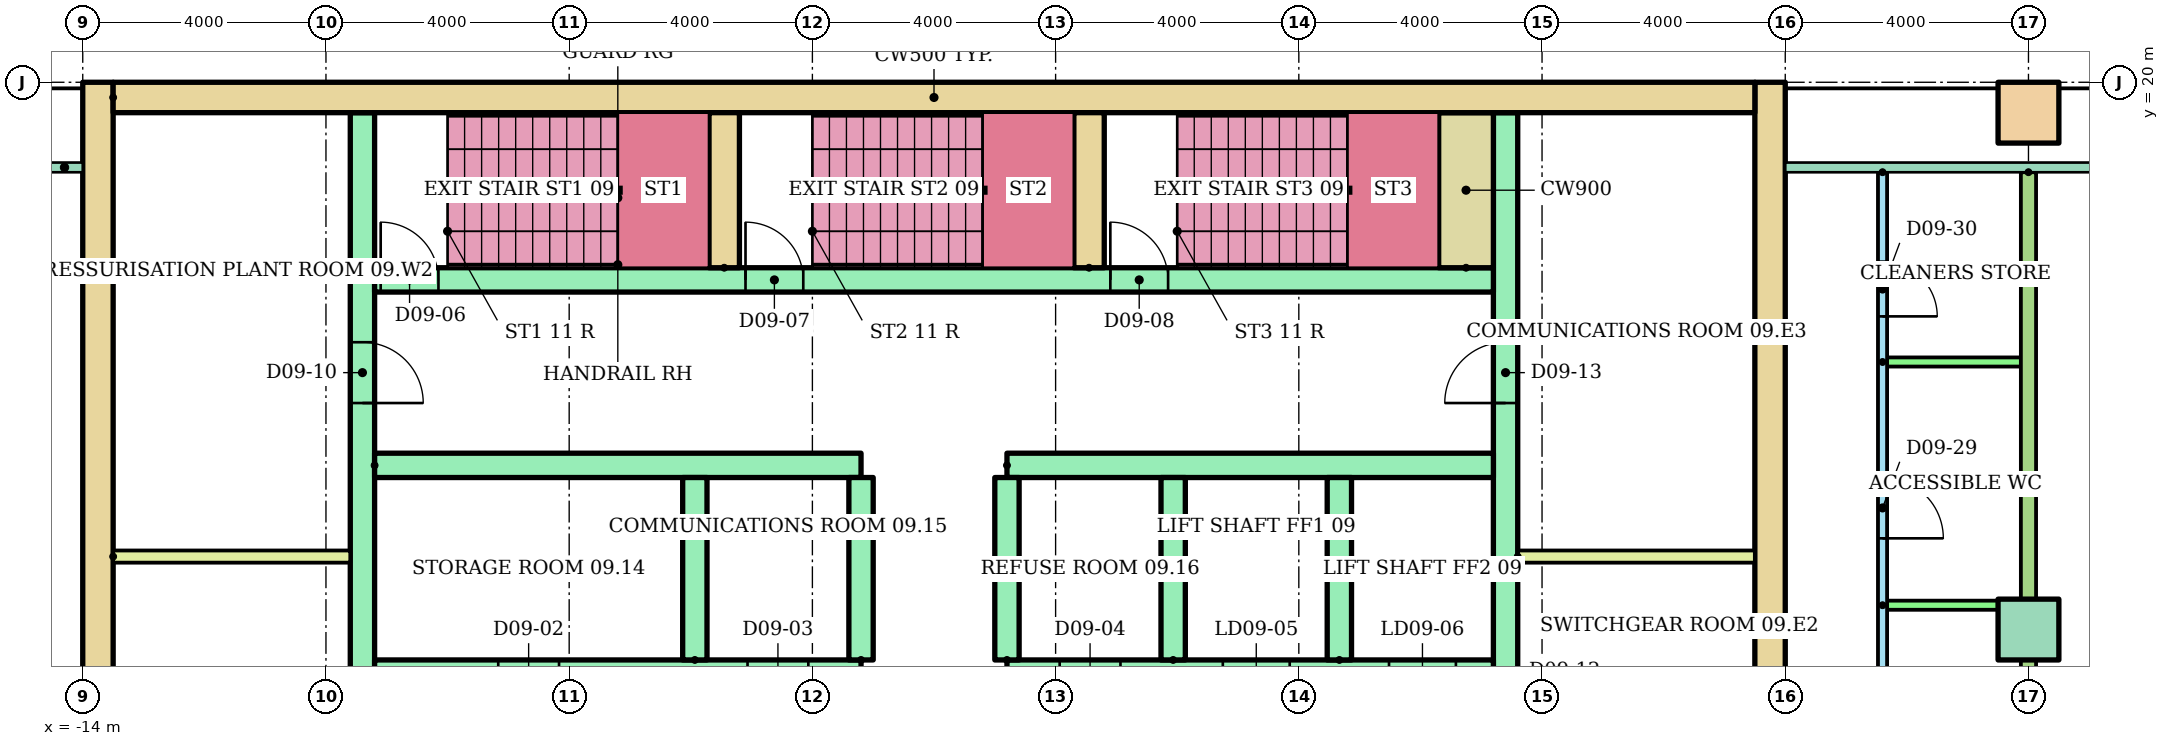
"""IFC4 building model, lengths in metres.
Left out: names, types, materials, properties, quantities, classifications, styles, units other than length and angle.
Written with IfcOpenShell. Run it as: python <this file> out.ifc"""

import sys

from ifc_helpers import new_model, si_unit, direction, frame, frame_2d, origin, origin_2d, place, context, subcontext, project, spatial, rectangle, hollow_rectangle, extrude, element, fill, save


model = new_model("IFC4")
c1 = context("Model", 3, precision=1e-05, world=origin(), true_north=direction((0.0, 1.0)))
c2 = subcontext(c1, "Body", "Model", "MODEL_VIEW")
j1 = project(units=[si_unit("LENGTHUNIT", "METRE"), si_unit("PLANEANGLEUNIT", "RADIAN")], contexts=[c1])
p1 = place(None, origin())
s1 = spatial("IfcSite", under=j1, at=p1, CompositionType="ELEMENT")
p2 = place(p1, origin())
s2 = spatial("IfcBuilding", under=s1, at=p2, CompositionType="ELEMENT")
p3 = place(p2, frame((0.0, 0.0, 37.7)))
s3 = spatial("IfcBuildingStorey", under=s2, at=p3, CompositionType="ELEMENT", Elevation=37.7)
p4 = place(p3, frame((18.0, 11.0, 0.0)))
e1 = element("IfcColumn", 1, at=p4, inside=s3, PredefinedType="COLUMN", context=c2, shape_type="SweptSolid", body=[
    extrude(rectangle(XDim=1.0, YDim=1.0, at=origin_2d()), origin(), (0.0, 0.0, 1.0), 3.9),
])
p5 = place(p3, frame((18.0, 19.5, 0.0)))
e2 = element("IfcColumn", 2, at=p5, inside=s3, PredefinedType="COLUMN", context=c2, shape_type="SweptSolid", body=[
    extrude(hollow_rectangle(XDim=1.0, YDim=1.0, WallThickness=0.05, at=origin_2d()), origin(), (0.0, 0.0, 1.0), 3.9),
])
for number, where, z_axis, x_axis in (
    (3, (-13.75, 3.0, 0.0), (0.0, 0.0, 1.0), (0.0, 1.0, 0.0)),
    (4, (13.75, 3.0, 0.0), (0.0, 0.0, 1.0), (0.0, 1.0, 0.0)),
):
    element("IfcWall", number, at=place(p3, frame(where, z_axis=z_axis, x_axis=x_axis)), inside=s3, PredefinedType="SHEAR", context=c2, shape_type="SweptSolid", body=[
        extrude(rectangle(XDim=17.0, YDim=0.5, at=frame_2d((8.5, 0.0))), origin(), (0.0, 0.0, 1.0), 3.62),
    ])
p6 = place(p3, frame((-13.5, 19.75, 0.0)))
e5 = element("IfcWall", 5, at=p6, inside=s3, PredefinedType="SHEAR", context=c2, shape_type="SweptSolid", body=[
    extrude(rectangle(XDim=27.0, YDim=0.5, at=frame_2d((13.5, 0.0))), origin(), (0.0, 0.0, 1.0), 3.62),
])
p7 = place(p3, frame((-9.4, 6.8, 0.0), z_axis=(0.0, 0.0, 1.0), x_axis=(0.0, 1.0, 0.0)))
e6 = element("IfcWall", 6, at=p7, inside=s3, PredefinedType="SHEAR", context=c2, shape_type="SweptSolid", body=[
    extrude(rectangle(XDim=12.7, YDim=0.4, at=frame_2d((6.35, 0.0))), origin(), (0.0, 0.0, 1.0), 3.62),
])
p8 = place(p7, frame((1.15, 0.0, 0.0)))
e7 = element("IfcOpeningElement", 7, at=p8, cuts=e6, PredefinedType="OPENING", context=c2, shape_type="SweptSolid", body=[
    extrude(rectangle(XDim=1.0, YDim=2.1, at=frame_2d((0.5, 1.05))), frame((0.0, 0.21, 0.0), z_axis=(0.0, -1.0, 0.0), x_axis=(1.0, 0.0, 0.0)), (0.0, 0.0, 1.0), 0.42),
])
p9 = place(p7, frame((7.925, 0.0, 0.0)))
e8 = element("IfcOpeningElement", 8, at=p9, cuts=e6, PredefinedType="OPENING", context=c2, shape_type="SweptSolid", body=[
    extrude(rectangle(XDim=1.0, YDim=2.1, at=frame_2d((0.5, 1.05))), frame((0.0, 0.21, 0.0), z_axis=(0.0, -1.0, 0.0), x_axis=(1.0, 0.0, 0.0)), (0.0, 0.0, 1.0), 0.42),
])
p10 = place(p3, frame((9.4, 6.8, 0.0), z_axis=(0.0, 0.0, 1.0), x_axis=(0.0, 1.0, 0.0)))
e9 = element("IfcWall", 9, at=p10, inside=s3, PredefinedType="SHEAR", context=c2, shape_type="SweptSolid", body=[
    extrude(rectangle(XDim=12.7, YDim=0.4, at=frame_2d((6.35, 0.0))), origin(), (0.0, 0.0, 1.0), 3.62),
])
p11 = place(p10, frame((0.3, 0.0, 0.0)))
e10 = element("IfcOpeningElement", 10, at=p11, cuts=e9, PredefinedType="OPENING", context=c2, shape_type="SweptSolid", body=[
    extrude(rectangle(XDim=1.0, YDim=2.1, at=frame_2d((0.5, 1.05))), frame((0.0, 0.21, 0.0), z_axis=(0.0, -1.0, 0.0), x_axis=(1.0, 0.0, 0.0)), (0.0, 0.0, 1.0), 0.42),
])
p12 = place(p10, frame((2.05, 0.0, 0.0)))
e11 = element("IfcOpeningElement", 11, at=p12, cuts=e9, PredefinedType="OPENING", context=c2, shape_type="SweptSolid", body=[
    extrude(rectangle(XDim=1.0, YDim=2.1, at=frame_2d((0.5, 1.05))), frame((0.0, 0.21, 0.0), z_axis=(0.0, -1.0, 0.0), x_axis=(1.0, 0.0, 0.0)), (0.0, 0.0, 1.0), 0.42),
])
p13 = place(p10, frame((7.925, 0.0, 0.0)))
e12 = element("IfcOpeningElement", 12, at=p13, cuts=e9, PredefinedType="OPENING", context=c2, shape_type="SweptSolid", body=[
    extrude(rectangle(XDim=1.0, YDim=2.1, at=frame_2d((0.5, 1.05))), frame((0.0, 0.21, 0.0), z_axis=(0.0, -1.0, 0.0), x_axis=(1.0, 0.0, 0.0)), (0.0, 0.0, 1.0), 0.42),
])
p14 = place(p3, frame((-9.2, 10.3, 0.0)))
e13 = element("IfcWall", 13, at=p14, inside=s3, PredefinedType="SHEAR", context=c2, shape_type="SweptSolid", body=[
    extrude(rectangle(XDim=8.0, YDim=0.4, at=frame_2d((4.0, 0.0))), origin(), (0.0, 0.0, 1.0), 3.62),
])
p15 = place(p14, frame((2.033, 0.0, 0.0)))
e14 = element("IfcOpeningElement", 14, at=p15, cuts=e13, PredefinedType="OPENING", context=c2, shape_type="SweptSolid", body=[
    extrude(rectangle(XDim=1.0, YDim=2.1, at=frame_2d((0.5, 1.05))), frame((0.0, 0.21, 0.0), z_axis=(0.0, -1.0, 0.0), x_axis=(1.0, 0.0, 0.0)), (0.0, 0.0, 1.0), 0.42),
])
p16 = place(p14, frame((6.133, 0.0, 0.0)))
e15 = element("IfcOpeningElement", 15, at=p16, cuts=e13, PredefinedType="OPENING", context=c2, shape_type="SweptSolid", body=[
    extrude(rectangle(XDim=1.0, YDim=2.1, at=frame_2d((0.5, 1.05))), frame((0.0, 0.21, 0.0), z_axis=(0.0, -1.0, 0.0), x_axis=(1.0, 0.0, 0.0)), (0.0, 0.0, 1.0), 0.42),
])
p17 = place(p3, frame((-9.2, 13.7, 0.0)))
e16 = element("IfcWall", 16, at=p17, inside=s3, PredefinedType="SHEAR", context=c2, shape_type="SweptSolid", body=[
    extrude(rectangle(XDim=8.0, YDim=0.4, at=frame_2d((4.0, 0.0))), origin(), (0.0, 0.0, 1.0), 3.62),
])
p18 = place(p3, frame((1.2, 10.3, 0.0)))
e17 = element("IfcWall", 17, at=p18, inside=s3, PredefinedType="SHEAR", context=c2, shape_type="SweptSolid", body=[
    extrude(rectangle(XDim=8.0, YDim=0.4, at=frame_2d((4.0, 0.0))), origin(), (0.0, 0.0, 1.0), 3.62),
])
p19 = place(p18, frame((3.55, 0.0, 0.0)))
e18 = element("IfcOpeningElement", 18, at=p19, cuts=e17, PredefinedType="OPENING", context=c2, shape_type="SweptSolid", body=[
    extrude(rectangle(XDim=1.1, YDim=2.1, at=frame_2d((0.55, 1.05))), frame((0.0, 0.21, 0.0), z_axis=(0.0, -1.0, 0.0), x_axis=(1.0, 0.0, 0.0)), (0.0, 0.0, 1.0), 0.42),
])
p20 = place(p18, frame((6.283, 0.0, 0.0)))
e19 = element("IfcOpeningElement", 19, at=p20, cuts=e17, PredefinedType="OPENING", context=c2, shape_type="SweptSolid", body=[
    extrude(rectangle(XDim=1.1, YDim=2.1, at=frame_2d((0.55, 1.05))), frame((0.0, 0.21, 0.0), z_axis=(0.0, -1.0, 0.0), x_axis=(1.0, 0.0, 0.0)), (0.0, 0.0, 1.0), 0.42),
])
p21 = place(p18, frame((0.867, 0.0, 0.0)))
e20 = element("IfcOpeningElement", 20, at=p21, cuts=e17, PredefinedType="OPENING", context=c2, shape_type="SweptSolid", body=[
    extrude(rectangle(XDim=1.0, YDim=2.1, at=frame_2d((0.5, 1.05))), frame((0.0, 0.21, 0.0), z_axis=(0.0, -1.0, 0.0), x_axis=(1.0, 0.0, 0.0)), (0.0, 0.0, 1.0), 0.42),
])
p22 = place(p3, frame((1.2, 13.7, 0.0)))
e21 = element("IfcWall", 21, at=p22, inside=s3, PredefinedType="SHEAR", context=c2, shape_type="SweptSolid", body=[
    extrude(rectangle(XDim=8.0, YDim=0.4, at=frame_2d((4.0, 0.0))), origin(), (0.0, 0.0, 1.0), 3.62),
])
for number, where, z_axis, x_axis in (
    (22, (-3.933, 10.5, 0.0), (0.0, 0.0, 1.0), (0.0, 1.0, 0.0)),
    (23, (-1.2, 10.5, 0.0), (0.0, 0.0, 1.0), (0.0, 1.0, 0.0)),
    (24, (1.2, 10.5, 0.0), (0.0, 0.0, 1.0), (0.0, 1.0, 0.0)),
    (25, (3.933, 10.5, 0.0), (0.0, 0.0, 1.0), (0.0, 1.0, 0.0)),
    (26, (6.667, 10.5, 0.0), (0.0, 0.0, 1.0), (0.0, 1.0, 0.0)),
):
    element("IfcWall", number, at=place(p3, frame(where, z_axis=z_axis, x_axis=x_axis)), inside=s3, PredefinedType="SHEAR", context=c2, shape_type="SweptSolid", body=[
        extrude(rectangle(XDim=3.0, YDim=0.4, at=frame_2d((1.5, 0.0))), origin(), (0.0, 0.0, 1.0), 3.62),
    ])
p23 = place(p3, frame((-9.2, 16.75, 0.0)))
e27 = element("IfcWall", 27, at=p23, inside=s3, PredefinedType="SHEAR", context=c2, shape_type="SweptSolid", body=[
    extrude(rectangle(XDim=18.4, YDim=0.4, at=frame_2d((9.2, 0.0))), origin(), (0.0, 0.0, 1.0), 3.62),
])
p24 = place(p23, frame((0.1, 0.0, 0.0)))
e28 = element("IfcOpeningElement", 28, at=p24, cuts=e27, PredefinedType="OPENING", context=c2, shape_type="SweptSolid", body=[
    extrude(rectangle(XDim=0.95, YDim=2.1, at=frame_2d((0.475, 1.05))), frame((0.0, 0.21, 0.0), z_axis=(0.0, -1.0, 0.0), x_axis=(1.0, 0.0, 0.0)), (0.0, 0.0, 1.0), 0.42),
])
p25 = place(p23, frame((6.1, 0.0, 0.0)))
e29 = element("IfcOpeningElement", 29, at=p25, cuts=e27, PredefinedType="OPENING", context=c2, shape_type="SweptSolid", body=[
    extrude(rectangle(XDim=0.95, YDim=2.1, at=frame_2d((0.475, 1.05))), frame((0.0, 0.21, 0.0), z_axis=(0.0, -1.0, 0.0), x_axis=(1.0, 0.0, 0.0)), (0.0, 0.0, 1.0), 0.42),
])
p26 = place(p23, frame((12.1, 0.0, 0.0)))
e30 = element("IfcOpeningElement", 30, at=p26, cuts=e27, PredefinedType="OPENING", context=c2, shape_type="SweptSolid", body=[
    extrude(rectangle(XDim=0.95, YDim=2.1, at=frame_2d((0.475, 1.05))), frame((0.0, 0.21, 0.0), z_axis=(0.0, -1.0, 0.0), x_axis=(1.0, 0.0, 0.0)), (0.0, 0.0, 1.0), 0.42),
])
for number, where, z_axis, x_axis in (
    (31, (-3.45, 16.95, 0.0), (0.0, 0.0, 1.0), (0.0, 1.0, 0.0)),
    (32, (2.55, 16.95, 0.0), (0.0, 0.0, 1.0), (0.0, 1.0, 0.0)),
):
    element("IfcWall", number, at=place(p3, frame(where, z_axis=z_axis, x_axis=x_axis)), inside=s3, PredefinedType="SHEAR", context=c2, shape_type="SweptSolid", body=[
        extrude(rectangle(XDim=2.55, YDim=0.5, at=frame_2d((1.275, 0.0))), origin(), (0.0, 0.0, 1.0), 3.62),
    ])
p27 = place(p3, frame((8.75, 16.95, 0.0), z_axis=(0.0, 0.0, 1.0), x_axis=(0.0, 1.0, 0.0)))
e33 = element("IfcWall", 33, at=p27, inside=s3, PredefinedType="SHEAR", context=c2, shape_type="SweptSolid", body=[
    extrude(rectangle(XDim=2.55, YDim=0.9, at=frame_2d((1.275, 0.0))), origin(), (0.0, 0.0, 1.0), 3.62),
])
for number, where in (
    (34, (-13.5, 12.2, 0.0)),
    (35, (9.6, 12.2, 0.0)),
):
    element("IfcWall", number, at=place(p3, frame(where)), inside=s3, PredefinedType="PARTITIONING", context=c2, shape_type="SweptSolid", body=[
        extrude(rectangle(XDim=3.9, YDim=0.2, at=frame_2d((1.95, 0.0))), origin(), (0.0, 0.0, 1.0), 3.62),
    ])
p28 = place(p3, frame((15.6, 18.521, 0.0), z_axis=(0.0, 0.0, 1.0), x_axis=(0.0, -1.0, 0.0)))
e36 = element("IfcWall", 36, at=p28, inside=s3, PredefinedType="PARTITIONING", context=c2, shape_type="SweptSolid", body=[
    extrude(rectangle(XDim=17.121, YDim=0.15, at=frame_2d((8.561, 0.0))), origin(), (0.0, 0.0, 1.0), 3.1),
])
p29 = place(p28, frame((15.071, 0.0, 0.0)))
e37 = element("IfcOpeningElement", 37, at=p29, cuts=e36, PredefinedType="OPENING", context=c2, shape_type="SweptSolid", body=[
    extrude(rectangle(XDim=0.9, YDim=2.1, at=frame_2d((0.45, 1.05))), frame((0.0, 0.085, 0.0), z_axis=(0.0, -1.0, 0.0), x_axis=(1.0, 0.0, 0.0)), (0.0, 0.0, 1.0), 0.17),
])
p30 = place(p28, frame((10.071, 0.0, 0.0)))
e38 = element("IfcOpeningElement", 38, at=p30, cuts=e36, PredefinedType="OPENING", context=c2, shape_type="SweptSolid", body=[
    extrude(rectangle(XDim=0.9, YDim=2.1, at=frame_2d((0.45, 1.05))), frame((0.0, 0.085, 0.0), z_axis=(0.0, -1.0, 0.0), x_axis=(1.0, 0.0, 0.0)), (0.0, 0.0, 1.0), 0.17),
])
p31 = place(p28, frame((5.021, 0.0, 0.0)))
e39 = element("IfcOpeningElement", 39, at=p31, cuts=e36, PredefinedType="OPENING", context=c2, shape_type="SweptSolid", body=[
    extrude(rectangle(XDim=1.0, YDim=2.1, at=frame_2d((0.5, 1.05))), frame((0.0, 0.085, 0.0), z_axis=(0.0, -1.0, 0.0), x_axis=(1.0, 0.0, 0.0)), (0.0, 0.0, 1.0), 0.17),
])
p32 = place(p28, frame((1.471, 0.0, 0.0)))
e40 = element("IfcOpeningElement", 40, at=p32, cuts=e36, PredefinedType="OPENING", context=c2, shape_type="SweptSolid", body=[
    extrude(rectangle(XDim=0.9, YDim=2.1, at=frame_2d((0.45, 1.05))), frame((0.0, 0.085, 0.0), z_axis=(0.0, -1.0, 0.0), x_axis=(1.0, 0.0, 0.0)), (0.0, 0.0, 1.0), 0.17),
])
for number, where in (
    (41, (15.6, 11.4, 0.0)),
    (42, (15.6, 15.4, 0.0)),
):
    element("IfcWall", number, at=place(p3, frame(where)), inside=s3, PredefinedType="PARTITIONING", context=c2, shape_type="SweptSolid", body=[
        extrude(rectangle(XDim=2.4, YDim=0.15, at=frame_2d((1.2, 0.0))), origin(), (0.0, 0.0, 1.0), 3.1),
    ])
p33 = place(p3, frame((18.0, 18.521, 0.0), z_axis=(0.0, 0.0, 1.0), x_axis=(0.0, -1.0, 0.0)))
e43 = element("IfcWall", 43, at=p33, inside=s3, PredefinedType="PARTITIONING", context=c2, shape_type="SweptSolid", body=[
    extrude(rectangle(XDim=17.121, YDim=0.25, at=frame_2d((8.561, 0.0))), origin(), (0.0, 0.0, 1.0), 3.1),
])
p34 = place(p24, origin())
e44 = element("IfcDoor", 44, at=p34, inside=s3, OperationType="SINGLE_SWING_LEFT", PredefinedType="DOOR", context=c2, shape_type="SweptSolid", body=[
    extrude(rectangle(XDim=0.95, YDim=2.1, at=frame_2d((0.475, 1.05))), frame((0.0, 0.025, 0.0), z_axis=(0.0, -1.0, 0.0), x_axis=(1.0, 0.0, 0.0)), (0.0, 0.0, 1.0), 0.05),
])
fill(e28, e44)
p35 = place(p25, origin())
e45 = element("IfcDoor", 45, at=p35, inside=s3, OperationType="SINGLE_SWING_LEFT", PredefinedType="DOOR", context=c2, shape_type="SweptSolid", body=[
    extrude(rectangle(XDim=0.95, YDim=2.1, at=frame_2d((0.475, 1.05))), frame((0.0, 0.025, 0.0), z_axis=(0.0, -1.0, 0.0), x_axis=(1.0, 0.0, 0.0)), (0.0, 0.0, 1.0), 0.05),
])
fill(e29, e45)
p36 = place(p26, origin())
e46 = element("IfcDoor", 46, at=p36, inside=s3, OperationType="SINGLE_SWING_LEFT", PredefinedType="DOOR", context=c2, shape_type="SweptSolid", body=[
    extrude(rectangle(XDim=0.95, YDim=2.1, at=frame_2d((0.475, 1.05))), frame((0.0, 0.025, 0.0), z_axis=(0.0, -1.0, 0.0), x_axis=(1.0, 0.0, 0.0)), (0.0, 0.0, 1.0), 0.05),
])
fill(e30, e46)
p37 = place(p9, frame((1.0, 0.0, 0.0), z_axis=(0.0, 0.0, 1.0), x_axis=(-1.0, 0.0, 0.0)))
e47 = element("IfcDoor", 47, at=p37, inside=s3, OperationType="SINGLE_SWING_LEFT", PredefinedType="DOOR", context=c2, shape_type="SweptSolid", body=[
    extrude(rectangle(XDim=1.0, YDim=2.1, at=frame_2d((0.5, 1.05))), frame((0.0, 0.025, 0.0), z_axis=(0.0, -1.0, 0.0), x_axis=(1.0, 0.0, 0.0)), (0.0, 0.0, 1.0), 0.05),
])
fill(e8, e47)
p38 = place(p13, origin())
e48 = element("IfcDoor", 48, at=p38, inside=s3, OperationType="SINGLE_SWING_LEFT", PredefinedType="DOOR", context=c2, shape_type="SweptSolid", body=[
    extrude(rectangle(XDim=1.0, YDim=2.1, at=frame_2d((0.5, 1.05))), frame((0.0, 0.025, 0.0), z_axis=(0.0, -1.0, 0.0), x_axis=(1.0, 0.0, 0.0)), (0.0, 0.0, 1.0), 0.05),
])
fill(e12, e48)
p39 = place(p31, origin())
e49 = element("IfcDoor", 49, at=p39, inside=s3, OperationType="SINGLE_SWING_RIGHT", PredefinedType="DOOR", context=c2, shape_type="SweptSolid", body=[
    extrude(rectangle(XDim=1.0, YDim=2.1, at=frame_2d((0.5, 1.05))), frame((0.0, 0.025, 0.0), z_axis=(0.0, -1.0, 0.0), x_axis=(1.0, 0.0, 0.0)), (0.0, 0.0, 1.0), 0.05),
])
fill(e39, e49)
p40 = place(p32, origin())
e50 = element("IfcDoor", 50, at=p40, inside=s3, OperationType="SINGLE_SWING_RIGHT", PredefinedType="DOOR", context=c2, shape_type="SweptSolid", body=[
    extrude(rectangle(XDim=0.9, YDim=2.1, at=frame_2d((0.45, 1.05))), frame((0.0, 0.025, 0.0), z_axis=(0.0, -1.0, 0.0), x_axis=(1.0, 0.0, 0.0)), (0.0, 0.0, 1.0), 0.05),
])
fill(e40, e50)
save(model, sys.argv[1])
